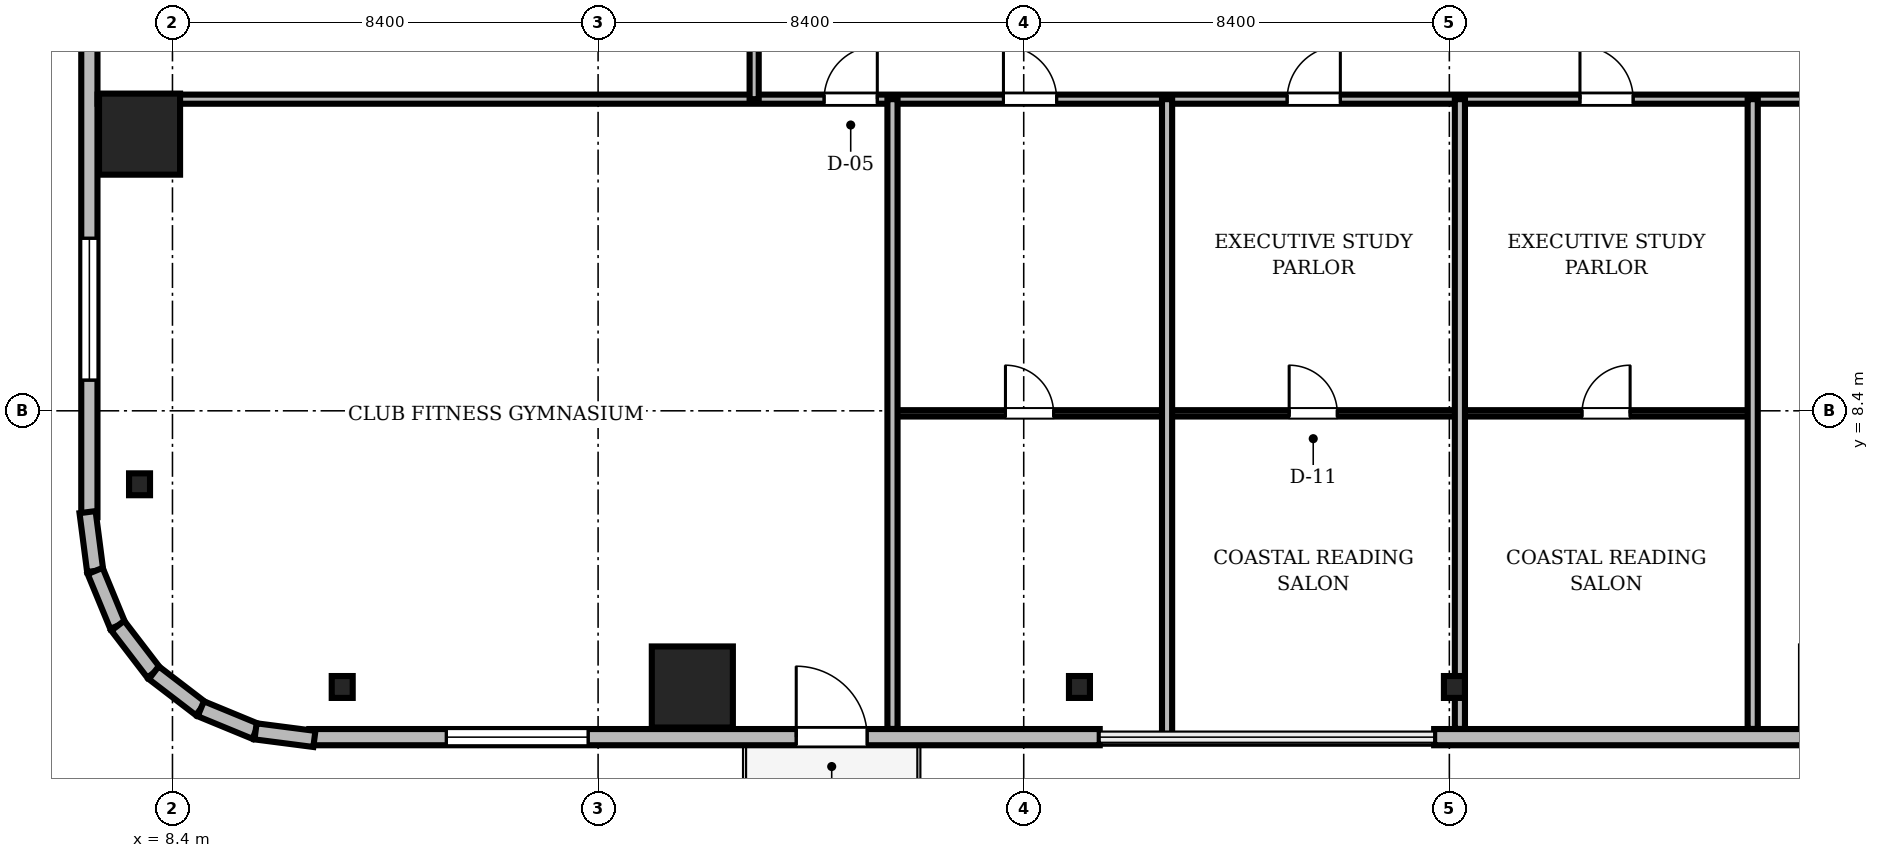
"""IFC4 building model, lengths in metres.
Left out: names, types, materials, properties, quantities, classifications, styles, units other than length and angle.
Written with IfcOpenShell. Run it as: python <this file> out.ifc"""

import sys

from ifc_helpers import new_model, si_unit, direction, frame, frame_2d, origin, origin_2d, place, context, subcontext, project, spatial, rectangle, i_section, extrude, source, transform, mapped, element, fill, save


model = new_model("IFC4")
c1 = context("Model", 3, precision=1e-05, world=origin(), true_north=direction((0.0, 1.0)))
c2 = subcontext(c1, "Body", "Model", "MODEL_VIEW")
j1 = project(units=[si_unit("LENGTHUNIT", "METRE"), si_unit("PLANEANGLEUNIT", "RADIAN")], contexts=[c1])
p1 = place(None, origin())
s1 = spatial("IfcSite", under=j1, at=p1, CompositionType="ELEMENT")
p2 = place(p1, origin())
s2 = spatial("IfcBuilding", under=s1, at=p2, CompositionType="ELEMENT")
p3 = place(p2, frame((0.0, 0.0, 148.3)))
s3 = spatial("IfcBuildingStorey", under=s2, at=p3, CompositionType="ELEMENT", Elevation=148.3)
m1 = source(origin(), c2, "Body", "SweptSolid", [
    extrude(rectangle(XDim=1.6, YDim=1.6, at=origin_2d()), origin(), (0.0, 0.0, 1.0), 3.46),
])
for number, where, z_axis, x_axis in (
    (1, (18.66, 2.95, 0.0), (0.0, 0.0, 1.0), (1.0, 0.0, 0.0)),
    (2, (7.75, 13.86, 0.0), (0.0, 0.0, 1.0), (1.0, 0.0, 0.0)),
):
    element("IfcColumn", number, at=place(p3, frame(where, z_axis=z_axis, x_axis=x_axis)), inside=s3, PredefinedType="COLUMN", context=c2, shape_type="MappedRepresentation", body=[
        mapped(m1, transform((0.0, 0.0, 0.0), scale=1.0)),
    ])
m2 = source(origin(), c2, "Body", "SweptSolid", [
    extrude(i_section(OverallWidth=0.414, OverallDepth=0.432, WebThickness=0.026, FlangeThickness=0.04, FilletRadius=0.015, at=origin_2d()), origin(), (0.0, 0.0, 1.0), 3.46),
])
for number, where, z_axis, x_axis in (
    (3, (11.75, 2.95, 0.0), (0.0, 0.0, 1.0), (1.0, 0.0, 0.0)),
    (4, (26.3, 2.95, 0.0), (0.0, 0.0, 1.0), (1.0, 0.0, 0.0)),
    (5, (33.7, 2.95, 0.0), (0.0, 0.0, 1.0), (1.0, 0.0, 0.0)),
    (6, (7.75, 6.95, 0.0), (0.0, 0.0, 1.0), (1.0, 0.0, 0.0)),
):
    element("IfcColumn", number, at=place(p3, frame(where, z_axis=z_axis, x_axis=x_axis)), inside=s3, PredefinedType="COLUMN", context=c2, shape_type="MappedRepresentation", body=[
        mapped(m2, transform((0.0, 0.0, 0.0), scale=1.0)),
    ])
m3 = source(origin(), c2, "Body", "SweptSolid", [
    extrude(rectangle(XDim=15.6, YDim=0.32, at=frame_2d((7.8, 0.0))), origin(), (0.0, 0.0, 1.0), 3.46),
])
p4 = place(p3, frame((11.1, 1.96, 0.0), z_axis=(0.0, 0.0, 1.0), x_axis=(1.0, 0.0, 0.0)))
e7 = element("IfcWall", 7, at=p4, inside=s3, PredefinedType="SOLIDWALL", context=c2, shape_type="MappedRepresentation", body=[
    mapped(m3, transform((0.0, 0.0, 0.0), scale=1.0)),
])
m4 = source(origin(), c2, "Body", "SweptSolid", [
    extrude(rectangle(XDim=1.4, YDim=2.3, at=frame_2d((0.7, 1.15))), frame((0.0, 0.17, 0.0), z_axis=(0.0, -1.0, 0.0), x_axis=(1.0, 0.0, 0.0)), (0.0, 0.0, 1.0), 0.34),
])
p5 = place(p4, frame((9.61, 0.0, 0.0)))
e8 = element("IfcOpeningElement", 8, at=p5, cuts=e7, PredefinedType="OPENING", context=c2, shape_type="MappedRepresentation", body=[
    mapped(m4, transform((0.0, 0.0, 0.0), scale=1.0)),
])
m5 = source(origin(), c2, "Body", "SweptSolid", [
    extrude(rectangle(XDim=2.8, YDim=2.4, at=frame_2d((1.4, 1.2))), frame((0.0, 0.17, 0.0), z_axis=(0.0, -1.0, 0.0), x_axis=(1.0, 0.0, 0.0)), (0.0, 0.0, 1.0), 0.34),
])
p6 = place(p4, frame((2.705, 0.0, 0.72)))
e9 = element("IfcOpeningElement", 9, at=p6, cuts=e7, PredefinedType="OPENING", context=c2, shape_type="MappedRepresentation", body=[
    mapped(m5, transform((0.0, 0.0, 0.0), scale=1.0)),
])
p7 = place(p3, frame((33.3, 1.96, 0.0), z_axis=(0.0, 0.0, 1.0), x_axis=(1.0, 0.0, 0.0)))
e10 = element("IfcWall", 10, at=p7, inside=s3, PredefinedType="SOLIDWALL", context=c2, shape_type="MappedRepresentation", body=[
    mapped(m3, transform((0.0, 0.0, 0.0), scale=1.0)),
])
p8 = place(p7, frame((8.745, 0.0, 0.72)))
e11 = element("IfcOpeningElement", 11, at=p8, cuts=e10, PredefinedType="OPENING", context=c2, shape_type="MappedRepresentation", body=[
    mapped(m5, transform((0.0, 0.0, 0.0), scale=1.0)),
])
p9 = place(p3, frame((6.76, 21.9, 0.0), z_axis=(0.0, 0.0, 1.0), x_axis=(0.0, -1.0, 0.0)))
e12 = element("IfcWall", 12, at=p9, inside=s3, PredefinedType="SOLIDWALL", context=c2, shape_type="MappedRepresentation", body=[
    mapped(m3, transform((0.0, 0.0, 0.0), scale=1.0)),
])
p10 = place(p9, frame((10.095, 0.0, 0.72)))
e13 = element("IfcOpeningElement", 13, at=p10, cuts=e12, PredefinedType="OPENING", context=c2, shape_type="MappedRepresentation", body=[
    mapped(m5, transform((0.0, 0.0, 0.0), scale=1.0)),
])
m6 = source(origin(), c2, "Body", "SweptSolid", [
    extrude(rectangle(XDim=1.171, YDim=0.32, at=frame_2d((0.585, 0.0))), origin(), (0.0, 0.0, 1.0), 3.46),
])
p11 = place(p3, frame((6.724, 6.401, 0.0), z_axis=(0.0, 0.0, 1.0), x_axis=(0.128269133229, -0.991739395941, 0.0)))
e14 = element("IfcWall", 14, at=p11, inside=s3, PredefinedType="SOLIDWALL", context=c2, shape_type="MappedRepresentation", body=[
    mapped(m6, transform((0.0, 0.0, 0.0), scale=1.0)),
])
m7 = source(origin(), c2, "Body", "SweptSolid", [
    extrude(rectangle(XDim=1.169, YDim=0.32, at=frame_2d((0.584, 0.0))), origin(), (0.0, 0.0, 1.0), 3.46),
])
for number, where, z_axis, x_axis in (
    (15, (6.875, 5.24, 0.0), (0.0, 0.0, 1.0), (0.381, -0.925, 0.0)),
    (16, (7.32, 4.159, 0.0), (0.0, 0.0, 1.0), (0.608, -0.794, 0.0)),
):
    element("IfcWall", number, at=place(p3, frame(where, z_axis=z_axis, x_axis=x_axis)), inside=s3, PredefinedType="SOLIDWALL", context=c2, shape_type="MappedRepresentation", body=[
        mapped(m7, transform((0.0, 0.0, 0.0), scale=1.0)),
    ])
m8 = source(origin(), c2, "Body", "SweptSolid", [
    extrude(rectangle(XDim=1.169, YDim=0.32, at=frame_2d((0.584, 0.0))), origin(), (0.0, 0.0, 1.0), 3.46),
])
p12 = place(p3, frame((8.031, 3.231, 0.0), z_axis=(0.0, 0.0, 1.0), x_axis=(0.793663520347, -0.608356981114, 0.0)))
e17 = element("IfcWall", 17, at=p12, inside=s3, PredefinedType="SOLIDWALL", context=c2, shape_type="MappedRepresentation", body=[
    mapped(m8, transform((0.0, 0.0, 0.0), scale=1.0)),
])
m9 = source(origin(), c2, "Body", "SweptSolid", [
    extrude(rectangle(XDim=1.169, YDim=0.32, at=frame_2d((0.585, 0.0))), origin(), (0.0, 0.0, 1.0), 3.46),
])
p13 = place(p3, frame((8.959, 2.52, 0.0), z_axis=(0.0, 0.0, 1.0), x_axis=(0.924479075121, -0.381232789334, 0.0)))
e18 = element("IfcWall", 18, at=p13, inside=s3, PredefinedType="SOLIDWALL", context=c2, shape_type="MappedRepresentation", body=[
    mapped(m9, transform((0.0, 0.0, 0.0), scale=1.0)),
])
m10 = source(origin(), c2, "Body", "SweptSolid", [
    extrude(rectangle(XDim=1.17, YDim=0.32, at=frame_2d((0.585, 0.0))), origin(), (0.0, 0.0, 1.0), 3.46),
])
p14 = place(p3, frame((10.04, 2.074, 0.0), z_axis=(0.0, 0.0, 1.0), x_axis=(0.991762485493, -0.128090485085, 0.0)))
e19 = element("IfcWall", 19, at=p14, inside=s3, PredefinedType="SOLIDWALL", context=c2, shape_type="MappedRepresentation", body=[
    mapped(m10, transform((0.0, 0.0, 0.0), scale=1.0)),
])
m11 = source(origin(), c2, "Body", "SweptSolid", [
    extrude(rectangle(XDim=46.156, YDim=0.18, at=frame_2d((23.078, 0.0))), origin(), (0.0, 0.0, 1.0), 2.702),
])
p15 = place(p3, frame((6.922, 14.55, 0.0), z_axis=(0.0, 0.0, 1.0), x_axis=(1.0, 0.0, 0.0)))
e20 = element("IfcWall", 20, at=p15, inside=s3, PredefinedType="PARTITIONING", context=c2, shape_type="MappedRepresentation", body=[
    mapped(m11, transform((0.0, 0.0, 0.0), scale=1.0)),
])
m12 = source(origin(), c2, "Body", "SweptSolid", [
    extrude(rectangle(XDim=1.05, YDim=2.2, at=frame_2d((0.525, 1.1))), frame((0.0, 0.1, 0.0), z_axis=(0.0, -1.0, 0.0), x_axis=(1.0, 0.0, 0.0)), (0.0, 0.0, 1.0), 0.2),
])
p16 = place(p15, frame((14.338, 0.0, 0.0)))
e21 = element("IfcOpeningElement", 21, at=p16, cuts=e20, PredefinedType="OPENING", context=c2, shape_type="MappedRepresentation", body=[
    mapped(m12, transform((0.0, 0.0, 0.0), scale=1.0)),
])
p17 = place(p15, frame((17.878, 0.0, 0.0)))
e22 = element("IfcOpeningElement", 22, at=p17, cuts=e20, PredefinedType="OPENING", context=c2, shape_type="MappedRepresentation", body=[
    mapped(m12, transform((0.0, 0.0, 0.0), scale=1.0)),
])
p18 = place(p15, frame((23.477, 0.0, 0.0)))
e23 = element("IfcOpeningElement", 23, at=p18, cuts=e20, PredefinedType="OPENING", context=c2, shape_type="MappedRepresentation", body=[
    mapped(m12, transform((0.0, 0.0, 0.0), scale=1.0)),
])
p19 = place(p15, frame((29.256, 0.0, 0.0)))
e24 = element("IfcOpeningElement", 24, at=p19, cuts=e20, PredefinedType="OPENING", context=c2, shape_type="MappedRepresentation", body=[
    mapped(m12, transform((0.0, 0.0, 0.0), scale=1.0)),
])
p20 = place(p15, frame((35.035, 0.0, 0.0)))
e25 = element("IfcOpeningElement", 25, at=p20, cuts=e20, PredefinedType="OPENING", context=c2, shape_type="MappedRepresentation", body=[
    mapped(m12, transform((0.0, 0.0, 0.0), scale=1.0)),
])
p21 = place(p15, frame((41.766, 0.0, 0.0)))
e26 = element("IfcOpeningElement", 26, at=p21, cuts=e20, PredefinedType="OPENING", context=c2, shape_type="MappedRepresentation", body=[
    mapped(m12, transform((0.0, 0.0, 0.0), scale=1.0)),
])
m13 = source(origin(), c2, "Body", "SweptSolid", [
    extrude(rectangle(XDim=14.0, YDim=0.18, at=frame_2d((7.0, 0.0))), origin(), (0.0, 0.0, 1.0), 2.852),
])
p22 = place(p3, frame((19.88, 14.55, 0.0), z_axis=(0.0, 0.0, 1.0), x_axis=(0.0, 1.0, 0.0)))
e27 = element("IfcWall", 27, at=p22, inside=s3, PredefinedType="PARTITIONING", context=c2, shape_type="MappedRepresentation", body=[
    mapped(m13, transform((0.0, 0.0, 0.0), scale=1.0)),
])
p23 = place(p22, frame((1.788, 0.0, 0.0)))
e28 = element("IfcOpeningElement", 28, at=p23, cuts=e27, PredefinedType="OPENING", context=c2, shape_type="MappedRepresentation", body=[
    mapped(m12, transform((0.0, 0.0, 0.0), scale=1.0)),
])
m14 = source(origin(), c2, "Body", "SweptSolid", [
    extrude(rectangle(XDim=0.95, YDim=2.15, at=frame_2d((0.475, 1.075))), frame((0.0, 0.1, 0.0), z_axis=(0.0, -1.0, 0.0), x_axis=(1.0, 0.0, 0.0)), (0.0, 0.0, 1.0), 0.2),
])
p24 = place(p22, frame((7.63, 0.0, 0.0)))
e29 = element("IfcOpeningElement", 29, at=p24, cuts=e27, PredefinedType="OPENING", context=c2, shape_type="MappedRepresentation", body=[
    mapped(m14, transform((0.0, 0.0, 0.0), scale=1.0)),
])
p25 = place(p22, frame((12.247, 0.0, 0.0)))
e30 = element("IfcOpeningElement", 30, at=p25, cuts=e27, PredefinedType="OPENING", context=c2, shape_type="MappedRepresentation", body=[
    mapped(m14, transform((0.0, 0.0, 0.0), scale=1.0)),
])
m15 = source(origin(), c2, "Body", "SweptSolid", [
    extrude(rectangle(XDim=5.779, YDim=0.125, at=frame_2d((2.89, 0.0))), origin(), (0.0, 0.0, 1.0), 2.852),
])
p26 = place(p3, frame((28.029, 8.35, 0.0), z_axis=(0.0, 0.0, 1.0), x_axis=(1.0, 0.0, 0.0)))
e31 = element("IfcWall", 31, at=p26, inside=s3, PredefinedType="PARTITIONING", context=c2, shape_type="MappedRepresentation", body=[
    mapped(m15, transform((0.0, 0.0, 0.0), scale=1.0)),
])
m16 = source(origin(), c2, "Body", "SweptSolid", [
    extrude(rectangle(XDim=0.95, YDim=2.15, at=frame_2d((0.475, 1.075))), frame((0.0, 0.073, 0.0), z_axis=(0.0, -1.0, 0.0), x_axis=(1.0, 0.0, 0.0)), (0.0, 0.0, 1.0), 0.145),
])
p27 = place(p26, frame((2.41, 0.0, 0.0)))
e32 = element("IfcOpeningElement", 32, at=p27, cuts=e31, PredefinedType="OPENING", context=c2, shape_type="MappedRepresentation", body=[
    mapped(m16, transform((0.0, 0.0, 0.0), scale=1.0)),
])
m17 = source(origin(), c2, "Body", "SweptSolid", [
    extrude(rectangle(XDim=5.779, YDim=0.125, at=frame_2d((2.889, 0.0))), origin(), (0.0, 0.0, 1.0), 2.852),
])
p28 = place(p3, frame((33.808, 8.35, 0.0), z_axis=(0.0, 0.0, 1.0), x_axis=(1.0, 0.0, 0.0)))
e33 = element("IfcWall", 33, at=p28, inside=s3, PredefinedType="PARTITIONING", context=c2, shape_type="MappedRepresentation", body=[
    mapped(m17, transform((0.0, 0.0, 0.0), scale=1.0)),
])
p29 = place(p28, frame((2.41, 0.0, 0.0)))
e34 = element("IfcOpeningElement", 34, at=p29, cuts=e33, PredefinedType="OPENING", context=c2, shape_type="MappedRepresentation", body=[
    mapped(m16, transform((0.0, 0.0, 0.0), scale=1.0)),
])
m18 = source(origin(), c2, "Body", "SweptSolid", [
    extrude(rectangle(XDim=5.419, YDim=0.125, at=frame_2d((2.709, 0.0))), origin(), (0.0, 0.0, 1.0), 2.852),
])
p30 = place(p3, frame((22.61, 8.35, 0.0), z_axis=(0.0, 0.0, 1.0), x_axis=(1.0, 0.0, 0.0)))
e35 = element("IfcWall", 35, at=p30, inside=s3, PredefinedType="PARTITIONING", context=c2, shape_type="MappedRepresentation", body=[
    mapped(m18, transform((0.0, 0.0, 0.0), scale=1.0)),
])
p31 = place(p30, frame((2.229, 0.0, 0.0)))
e36 = element("IfcOpeningElement", 36, at=p31, cuts=e35, PredefinedType="OPENING", context=c2, shape_type="MappedRepresentation", body=[
    mapped(m16, transform((0.0, 0.0, 0.0), scale=1.0)),
])
m19 = source(origin(), c2, "Body", "SweptSolid", [
    extrude(rectangle(XDim=12.428, YDim=0.2, at=frame_2d((6.214, 0.0))), origin(), (0.0, 0.0, 1.0), 2.702),
])
p32 = place(p3, frame((22.61, 2.122, 0.0), z_axis=(0.0, 0.0, 1.0), x_axis=(0.0, 1.0, 0.0)))
e37 = element("IfcWall", 37, at=p32, inside=s3, PredefinedType="PARTITIONING", context=c2, shape_type="MappedRepresentation", body=[
    mapped(m19, transform((0.0, 0.0, 0.0), scale=1.0)),
])
m20 = source(origin(), c2, "Body", "SweptSolid", [
    extrude(rectangle(XDim=12.62, YDim=0.2, at=frame_2d((6.31, 0.0))), origin(), (0.0, 0.0, 1.0), 2.702),
])
p33 = place(p3, frame((28.029, 1.93, 0.0), z_axis=(0.0, 0.0, 1.0), x_axis=(0.0, 1.0, 0.0)))
e38 = element("IfcWall", 38, at=p33, inside=s3, PredefinedType="PARTITIONING", context=c2, shape_type="MappedRepresentation", body=[
    mapped(m20, transform((0.0, 0.0, 0.0), scale=1.0)),
])
for number, where, z_axis, x_axis in (
    (39, (33.808, 2.122, 0.0), (0.0, 0.0, 1.0), (0.0, 1.0, 0.0)),
    (40, (39.587, 2.122, 0.0), (0.0, 0.0, 1.0), (0.0, 1.0, 0.0)),
):
    element("IfcWall", number, at=place(p3, frame(where, z_axis=z_axis, x_axis=x_axis)), inside=s3, PredefinedType="PARTITIONING", context=c2, shape_type="MappedRepresentation", body=[
        mapped(m19, transform((0.0, 0.0, 0.0), scale=1.0)),
    ])
m21 = source(origin(), c2, "Body", "SweptSolid", [
    extrude(rectangle(XDim=1.4, YDim=2.3, at=frame_2d((0.7, 1.15))), frame((0.0, 0.025, 0.0), z_axis=(0.0, -1.0, 0.0), x_axis=(1.0, 0.0, 0.0)), (0.0, 0.0, 1.0), 0.05),
])
p34 = place(p5, frame((1.4, 0.0, 0.0), z_axis=(0.0, 0.0, 1.0), x_axis=(-1.0, 0.0, 0.0)))
e41 = element("IfcDoor", 41, at=p34, inside=s3, OperationType="DOUBLE_DOOR_SLIDING", PredefinedType="DOOR", context=c2, shape_type="MappedRepresentation", body=[
    mapped(m21, transform((0.0, 0.0, 0.0), scale=1.0)),
])
fill(e8, e41)
m22 = source(origin(), c2, "Body", "SweptSolid", [
    extrude(rectangle(XDim=2.8, YDim=2.4, at=frame_2d((1.4, 1.2))), frame((0.0, 0.03, 0.0), z_axis=(0.0, -1.0, 0.0), x_axis=(1.0, 0.0, 0.0)), (0.0, 0.0, 1.0), 0.06),
])
p35 = place(p6, origin())
e42 = element("IfcWindow", 42, at=p35, inside=s3, PartitioningType="SINGLE_PANEL", PredefinedType="WINDOW", context=c2, shape_type="MappedRepresentation", body=[
    mapped(m22, transform((0.0, 0.0, 0.0), scale=1.0)),
])
fill(e9, e42)
p36 = place(p10, origin())
e43 = element("IfcWindow", 43, at=p36, inside=s3, PartitioningType="SINGLE_PANEL", PredefinedType="WINDOW", context=c2, shape_type="MappedRepresentation", body=[
    mapped(m22, transform((0.0, 0.0, 0.0), scale=1.0)),
])
fill(e13, e43)
m23 = source(origin(), c2, "Body", "SweptSolid", [
    extrude(rectangle(XDim=1.05, YDim=2.2, at=frame_2d((0.525, 1.1))), frame((0.0, 0.025, 0.0), z_axis=(0.0, -1.0, 0.0), x_axis=(1.0, 0.0, 0.0)), (0.0, 0.0, 1.0), 0.05),
])
p37 = place(p16, origin())
e44 = element("IfcDoor", 44, at=p37, inside=s3, OperationType="SINGLE_SWING_RIGHT", PredefinedType="DOOR", context=c2, shape_type="MappedRepresentation", body=[
    mapped(m23, transform((0.0, 0.0, 0.0), scale=1.0)),
])
fill(e21, e44)
p38 = place(p17, origin())
e45 = element("IfcDoor", 45, at=p38, inside=s3, OperationType="SINGLE_SWING_LEFT", PredefinedType="DOOR", context=c2, shape_type="MappedRepresentation", body=[
    mapped(m23, transform((0.0, 0.0, 0.0), scale=1.0)),
])
fill(e22, e45)
p39 = place(p18, origin())
e46 = element("IfcDoor", 46, at=p39, inside=s3, OperationType="SINGLE_SWING_RIGHT", PredefinedType="DOOR", context=c2, shape_type="MappedRepresentation", body=[
    mapped(m23, transform((0.0, 0.0, 0.0), scale=1.0)),
])
fill(e23, e46)
p40 = place(p19, origin())
e47 = element("IfcDoor", 47, at=p40, inside=s3, OperationType="SINGLE_SWING_LEFT", PredefinedType="DOOR", context=c2, shape_type="MappedRepresentation", body=[
    mapped(m23, transform((0.0, 0.0, 0.0), scale=1.0)),
])
fill(e24, e47)
m24 = source(origin(), c2, "Body", "SweptSolid", [
    extrude(rectangle(XDim=0.95, YDim=2.15, at=frame_2d((0.475, 1.075))), frame((0.0, 0.025, 0.0), z_axis=(0.0, -1.0, 0.0), x_axis=(1.0, 0.0, 0.0)), (0.0, 0.0, 1.0), 0.05),
])
p41 = place(p27, origin())
e48 = element("IfcDoor", 48, at=p41, inside=s3, OperationType="SINGLE_SWING_LEFT", PredefinedType="DOOR", context=c2, shape_type="MappedRepresentation", body=[
    mapped(m24, transform((0.0, 0.0, 0.0), scale=1.0)),
])
fill(e32, e48)
p42 = place(p29, origin())
e49 = element("IfcDoor", 49, at=p42, inside=s3, OperationType="SINGLE_SWING_RIGHT", PredefinedType="DOOR", context=c2, shape_type="MappedRepresentation", body=[
    mapped(m24, transform((0.0, 0.0, 0.0), scale=1.0)),
])
fill(e34, e49)
p43 = place(p31, origin())
e50 = element("IfcDoor", 50, at=p43, inside=s3, OperationType="SINGLE_SWING_LEFT", PredefinedType="DOOR", context=c2, shape_type="MappedRepresentation", body=[
    mapped(m24, transform((0.0, 0.0, 0.0), scale=1.0)),
])
fill(e36, e50)
save(model, sys.argv[1])
